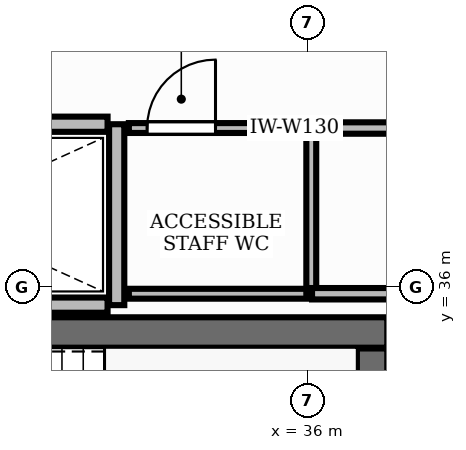
"""IFC4 building model, lengths in metres.
Left out: names, types, materials, properties, quantities, classifications, styles, units other than length and angle.
Written with IfcOpenShell. Run it as: python <this file> out.ifc"""

import sys

from ifc_helpers import new_model, si_unit, direction, frame, frame_2d, origin, place, context, subcontext, project, spatial, rectangle, extrude, element, fill, save


model = new_model("IFC4")
c1 = context("Model", 3, precision=1e-05, world=origin(), true_north=direction((0.0, 1.0)))
c2 = subcontext(c1, "Body", "Model", "MODEL_VIEW")
j1 = project(units=[si_unit("LENGTHUNIT", "METRE"), si_unit("PLANEANGLEUNIT", "RADIAN")], contexts=[c1])
p1 = place(None, origin())
s1 = spatial("IfcSite", under=j1, at=p1, CompositionType="ELEMENT")
p2 = place(p1, origin())
s2 = spatial("IfcBuilding", under=s1, at=p2, CompositionType="ELEMENT")
p3 = place(p2, frame((0.0, 0.0, 268.8)))
s3 = spatial("IfcBuildingStorey", under=s2, at=p3, CompositionType="ELEMENT", Elevation=268.8)
p4 = place(p3, frame((28.852, 35.4, 0.0), z_axis=(0.0, 0.0, 1.0), x_axis=(1.0, 0.0, 0.0)))
e1 = element("IfcWall", 1, at=p4, inside=s3, PredefinedType="SHEAR", context=c2, shape_type="SweptSolid", body=[
    extrude(rectangle(XDim=8.198, YDim=0.4, at=frame_2d((4.099, 0.0))), origin(), (0.0, 0.0, 1.0), 3.9),
])
p5 = place(p3, frame((36.85, 32.11, 0.0), z_axis=(0.0, 0.0, 1.0), x_axis=(0.0, 1.0, 0.0)))
e2 = element("IfcWall", 2, at=p5, inside=s3, PredefinedType="SHEAR", context=c2, shape_type="SweptSolid", body=[
    extrude(rectangle(XDim=3.08, YDim=0.4, at=frame_2d((1.54, 0.0))), origin(), (0.0, 0.0, 1.0), 3.9),
])
p6 = place(p3, frame((33.49, 35.76, 0.0), z_axis=(0.0, 0.0, 1.0), x_axis=(0.0, 1.0, 0.0)))
e3 = element("IfcWall", 3, at=p6, inside=s3, PredefinedType="PARTITIONING", context=c2, shape_type="SweptSolid", body=[
    extrude(rectangle(XDim=2.38, YDim=0.2, at=frame_2d((1.19, 0.0))), origin(), (0.0, 0.0, 1.0), 2.91),
])
for number, where, z_axis, x_axis in (
    (4, (28.8, 35.76, 0.0), (0.0, 0.0, 1.0), (1.0, 0.0, 0.0)),
    (5, (28.8, 38.14, 0.0), (0.0, 0.0, 1.0), (1.0, 0.0, 0.0)),
):
    element("IfcWall", number, at=place(p3, frame(where, z_axis=z_axis, x_axis=x_axis)), inside=s3, PredefinedType="PARTITIONING", context=c2, shape_type="SweptSolid", body=[
        extrude(rectangle(XDim=4.57, YDim=0.2, at=frame_2d((2.285, 0.0))), origin(), (0.0, 0.0, 1.0), 2.91),
    ])
p7 = place(p3, frame((33.65, 38.09, 0.0), z_axis=(0.0, 0.0, 1.0), x_axis=(1.0, 0.0, 0.0)))
e6 = element("IfcWall", 6, at=p7, inside=s3, PredefinedType="PARTITIONING", context=c2, shape_type="SweptSolid", body=[
    extrude(rectangle(XDim=2.4, YDim=0.13, at=frame_2d((1.2, 0.0))), origin(), (0.0, 0.0, 1.0), 2.91),
])
p8 = place(p7, frame((0.24, 0.0, 0.0)))
e7 = element("IfcOpeningElement", 7, at=p8, cuts=e6, PredefinedType="OPENING", context=c2, shape_type="SweptSolid", body=[
    extrude(rectangle(XDim=0.9, YDim=2.15, at=frame_2d((0.45, 1.075))), frame((0.0, 0.08, 0.0), z_axis=(0.0, -1.0, 0.0), x_axis=(1.0, 0.0, 0.0)), (0.0, 0.0, 1.0), 0.16),
])
p9 = place(p3, frame((36.05, 35.91, 0.0), z_axis=(0.0, 0.0, 1.0), x_axis=(-1.0, 0.0, 0.0)))
e8 = element("IfcWall", 8, at=p9, inside=s3, PredefinedType="PARTITIONING", context=c2, shape_type="SweptSolid", body=[
    extrude(rectangle(XDim=2.4, YDim=0.13, at=frame_2d((1.2, 0.0))), origin(), (0.0, 0.0, 1.0), 2.91),
])
p10 = place(p3, frame((36.05, 38.09, 0.0), z_axis=(0.0, 0.0, 1.0), x_axis=(0.0, -1.0, 0.0)))
e9 = element("IfcWall", 9, at=p10, inside=s3, PredefinedType="PARTITIONING", context=c2, shape_type="SweptSolid", body=[
    extrude(rectangle(XDim=2.18, YDim=0.13, at=frame_2d((1.09, 0.0))), origin(), (0.0, 0.0, 1.0), 2.91),
])
p11 = place(p3, frame((37.35, 35.91, 0.0), z_axis=(0.0, 0.0, 1.0), x_axis=(-1.0, 0.0, 0.0)))
e10 = element("IfcWall", 10, at=p11, inside=s3, PredefinedType="PARTITIONING", context=c2, shape_type="SweptSolid", body=[
    extrude(rectangle(XDim=1.29, YDim=0.15, at=frame_2d((0.645, 0.0))), origin(), (0.0, 0.0, 1.0), 2.91),
])
p12 = place(p3, frame((36.06, 38.09, 0.0), z_axis=(0.0, 0.0, 1.0), x_axis=(1.0, 0.0, 0.0)))
e11 = element("IfcWall", 11, at=p12, inside=s3, PredefinedType="PARTITIONING", context=c2, shape_type="SweptSolid", body=[
    extrude(rectangle(XDim=1.14, YDim=0.15, at=frame_2d((0.57, 0.0))), origin(), (0.0, 0.0, 1.0), 2.91),
])
p13 = place(p8, origin())
e12 = element("IfcDoor", 12, at=p13, inside=s3, OperationType="SINGLE_SWING_RIGHT", PredefinedType="DOOR", context=c2, shape_type="SweptSolid", body=[
    extrude(rectangle(XDim=0.9, YDim=2.15, at=frame_2d((0.45, 1.075))), frame((0.0, 0.025, 0.0), z_axis=(0.0, -1.0, 0.0), x_axis=(1.0, 0.0, 0.0)), (0.0, 0.0, 1.0), 0.05),
])
fill(e7, e12)
save(model, sys.argv[1])
